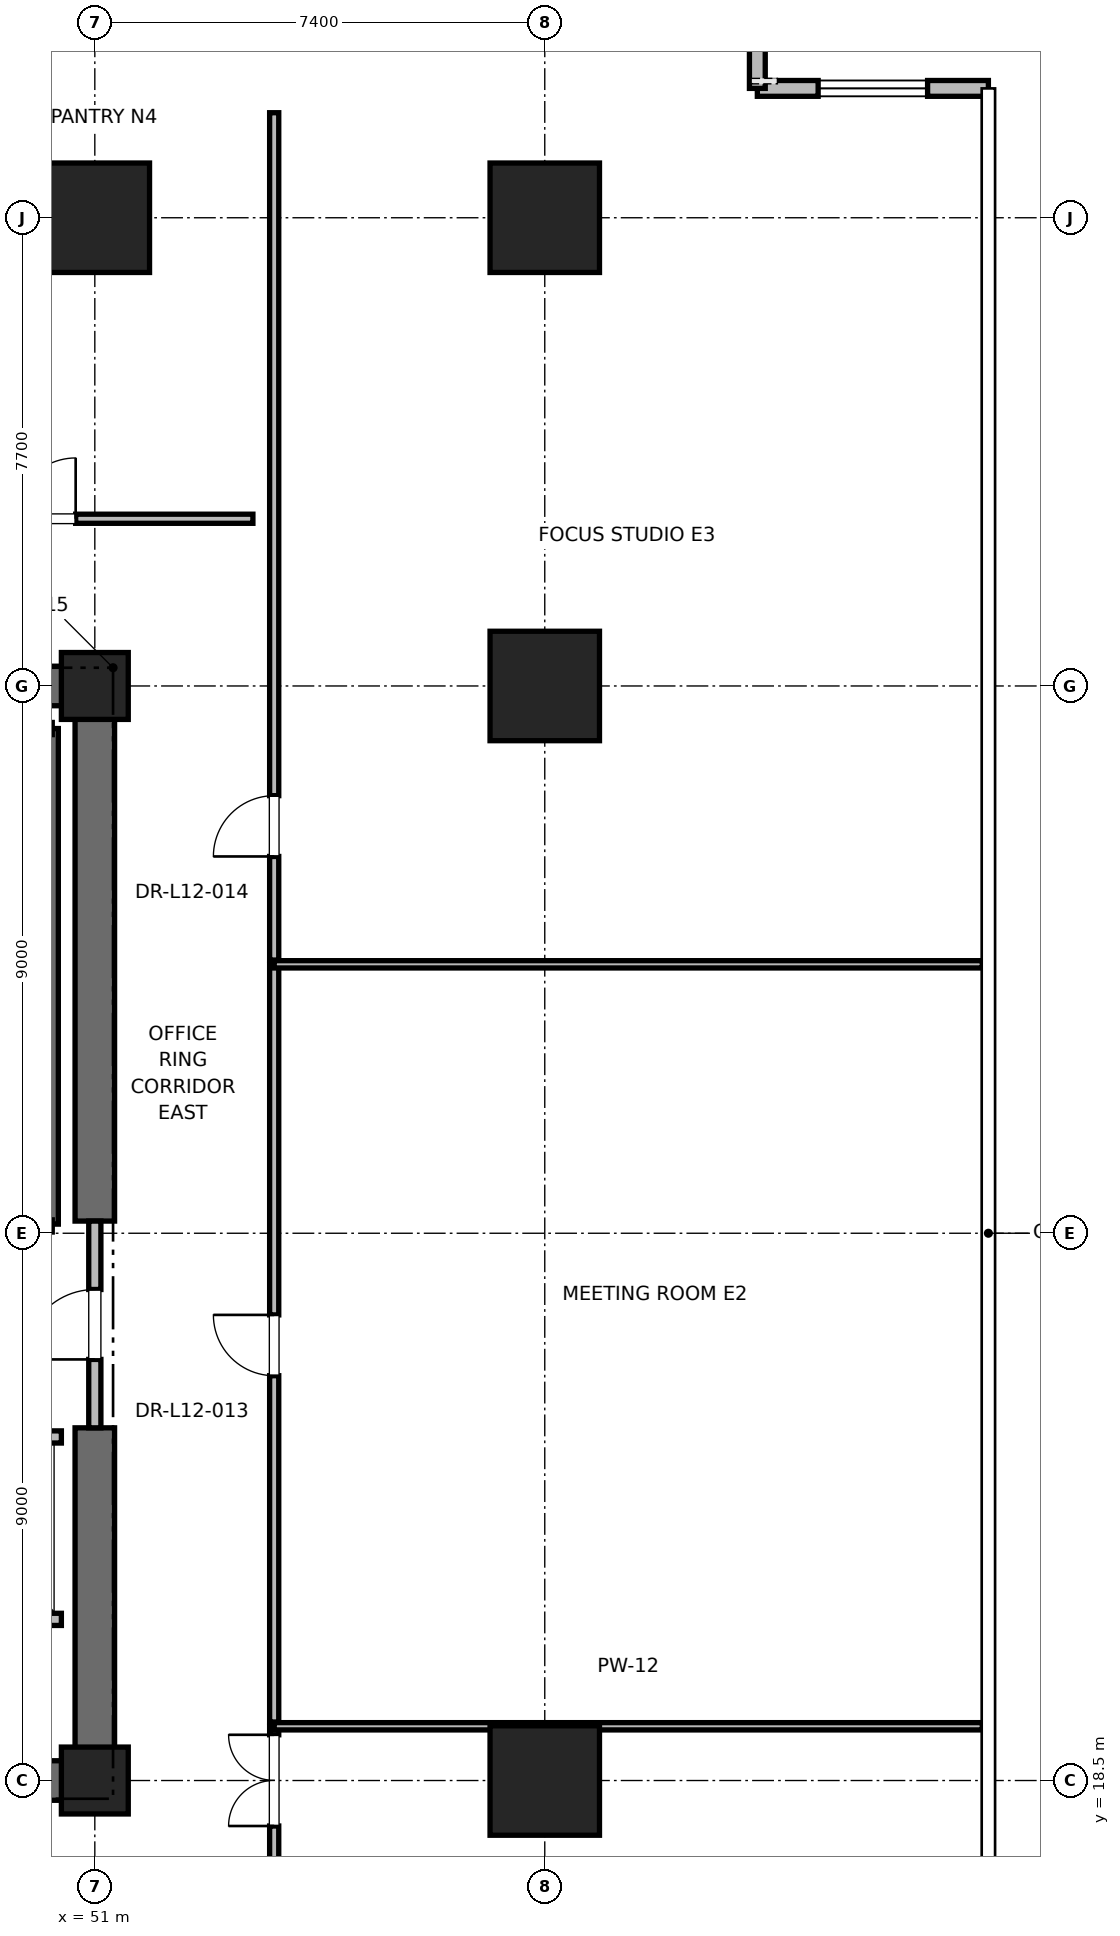
"""IFC4 building model, lengths in metres.
Left out: names, types, materials, properties, quantities, classifications, styles, units other than length and angle.
Written with IfcOpenShell. Run it as: python <this file> out.ifc"""

import sys

from ifc_helpers import new_model, si_unit, direction, frame, frame_2d, origin, origin_2d, place, context, subcontext, project, spatial, rectangle, extrude, element, fill, save


model = new_model("IFC4")
c1 = context("Model", 3, precision=1e-05, world=origin(), true_north=direction((0.0, 1.0)))
c2 = subcontext(c1, "Body", "Model", "MODEL_VIEW")
j1 = project(units=[si_unit("LENGTHUNIT", "METRE"), si_unit("PLANEANGLEUNIT", "RADIAN")], contexts=[c1])
p1 = place(None, origin())
s1 = spatial("IfcSite", under=j1, at=p1, CompositionType="ELEMENT")
p2 = place(p1, origin())
s2 = spatial("IfcBuilding", under=s1, at=p2, CompositionType="ELEMENT")
p3 = place(p2, frame((0.0, 0.0, 55.6)))
s3 = spatial("IfcBuildingStorey", under=s2, at=p3, CompositionType="ELEMENT", Elevation=55.6)
for number, where, z_axis, x_axis in (
    (1, (51.0, 44.2, 0.0), (0.0, 0.0, 1.0), (1.0, 0.0, 0.0)),
    (2, (58.4, 18.5, 0.0), (0.0, 0.0, 1.0), (1.0, 0.0, 0.0)),
    (3, (58.4, 36.5, 0.0), (0.0, 0.0, 1.0), (1.0, 0.0, 0.0)),
    (4, (58.4, 44.2, 0.0), (0.0, 0.0, 1.0), (1.0, 0.0, 0.0)),
):
    element("IfcColumn", number, at=place(p3, frame(where, z_axis=z_axis, x_axis=x_axis)), inside=s3, PredefinedType="COLUMN", context=c2, shape_type="SweptSolid", body=[
        extrude(rectangle(XDim=1.8, YDim=1.8, at=origin_2d()), origin(), (0.0, 0.0, 1.0), 4.0),
    ])
for number, where, z_axis, x_axis in (
    (5, (51.0, 18.5, 0.0), (0.0, 0.0, 1.0), (1.0, 0.0, 0.0)),
    (6, (51.0, 36.5, 0.0), (0.0, 0.0, 1.0), (1.0, 0.0, 0.0)),
):
    element("IfcColumn", number, at=place(p3, frame(where, z_axis=z_axis, x_axis=x_axis)), inside=s3, PredefinedType="PILASTER", context=c2, shape_type="SweptSolid", body=[
        extrude(rectangle(XDim=1.1, YDim=1.1, at=origin_2d()), origin(), (0.0, 0.0, 1.0), 4.0),
    ])
p4 = place(p3, frame((41.8, 18.5, 0.0), z_axis=(0.0, 0.0, 1.0), x_axis=(1.0, 0.0, 0.0)))
e7 = element("IfcWall", 7, at=p4, inside=s3, PredefinedType="SHEAR", context=c2, shape_type="SweptSolid", body=[
    extrude(rectangle(XDim=9.2, YDim=0.65, at=frame_2d((4.6, 0.0))), origin(), (0.0, 0.0, 1.0), 3.76),
])
for number, where, z_axis, x_axis in (
    (8, (45.2, 36.5, 0.0), (0.0, 0.0, 1.0), (1.0, 0.0, 0.0)),
    (9, (51.0, 18.5, 0.0), (0.0, 0.0, 1.0), (0.0, 1.0, 0.0)),
):
    element("IfcWall", number, at=place(p3, frame(where, z_axis=z_axis, x_axis=x_axis)), inside=s3, PredefinedType="SHEAR", context=c2, shape_type="SweptSolid", body=[
        extrude(rectangle(XDim=5.8, YDim=0.65, at=frame_2d((2.9, 0.0))), origin(), (0.0, 0.0, 1.0), 3.76),
    ])
p5 = place(p3, frame((51.0, 27.7, 0.0), z_axis=(0.0, 0.0, 1.0), x_axis=(0.0, 1.0, 0.0)))
e10 = element("IfcWall", 10, at=p5, inside=s3, PredefinedType="SHEAR", context=c2, shape_type="SweptSolid", body=[
    extrude(rectangle(XDim=8.8, YDim=0.65, at=frame_2d((4.4, 0.0))), origin(), (0.0, 0.0, 1.0), 3.76),
])
p6 = place(p3, frame((65.696, 46.327, 0.0), z_axis=(0.0, 0.0, 1.0), x_axis=(-1.0, 0.0, 0.0)))
e11 = element("IfcWall", 11, at=p6, inside=s3, PredefinedType="PARAPET", context=c2, shape_type="SweptSolid", body=[
    extrude(rectangle(XDim=3.8, YDim=0.26, at=frame_2d((1.9, 0.0))), origin(), (0.0, 0.0, 1.0), 3.76),
])
p7 = place(p6, frame((1.0, 0.0, 0.85)))
e12 = element("IfcOpeningElement", 12, at=p7, cuts=e11, PredefinedType="OPENING", context=c2, shape_type="SweptSolid", body=[
    extrude(rectangle(XDim=1.8, YDim=2.2, at=frame_2d((0.9, 1.1))), frame((0.0, 0.13, 0.0), z_axis=(0.0, -1.0, 0.0), x_axis=(1.0, 0.0, 0.0)), (0.0, 0.0, 1.0), 0.26),
])
p8 = place(p3, frame((61.896, 46.327, 0.0), z_axis=(0.0, 0.0, 1.0), x_axis=(0.0, 1.0, 0.0)))
e13 = element("IfcWall", 13, at=p8, inside=s3, PredefinedType="PARAPET", context=c2, shape_type="SweptSolid", body=[
    extrude(rectangle(XDim=3.4, YDim=0.26, at=frame_2d((1.7, 0.0))), origin(), (0.0, 0.0, 1.0), 3.76),
])
p9 = place(p3, frame((50.3, 27.65, 0.0), z_axis=(0.0, 0.0, 1.0), x_axis=(0.0, 1.0, 0.0)))
e14 = element("IfcWall", 14, at=p9, inside=s3, PredefinedType="SOLIDWALL", context=c2, shape_type="SweptSolid", body=[
    extrude(rectangle(XDim=8.15, YDim=0.2, at=frame_2d((4.075, 0.0))), origin(), (0.0, 0.0, 1.0), 3.76),
])
p10 = place(p3, frame((51.0, 24.3, 0.0), z_axis=(0.0, 0.0, 1.0), x_axis=(0.0, 1.0, 0.0)))
e15 = element("IfcWall", 15, at=p10, inside=s3, PredefinedType="PARTITIONING", context=c2, shape_type="SweptSolid", body=[
    extrude(rectangle(XDim=3.4, YDim=0.2, at=frame_2d((1.7, 0.0))), origin(), (0.0, 0.0, 1.0), 2.54),
])
p11 = place(p10, frame((1.125, 0.0, 0.0)))
e16 = element("IfcOpeningElement", 16, at=p11, cuts=e15, PredefinedType="OPENING", context=c2, shape_type="SweptSolid", body=[
    extrude(rectangle(XDim=1.15, YDim=2.2, at=frame_2d((0.575, 1.1))), frame((0.0, 0.1, 0.0), z_axis=(0.0, -1.0, 0.0), x_axis=(1.0, 0.0, 0.0)), (0.0, 0.0, 1.0), 0.2),
])
p12 = place(p3, frame((47.85, 21.15, 0.0), z_axis=(0.0, 0.0, 1.0), x_axis=(1.0, 0.0, 0.0)))
e17 = element("IfcWall", 17, at=p12, inside=s3, PredefinedType="SOLIDWALL", context=c2, shape_type="SweptSolid", body=[
    extrude(rectangle(XDim=2.6, YDim=0.2, at=frame_2d((1.3, 0.0))), origin(), (0.0, 0.0, 1.0), 3.76),
])
p13 = place(p3, frame((50.45, 24.15, 0.0), z_axis=(0.0, 0.0, 1.0), x_axis=(-1.0, 0.0, 0.0)))
e18 = element("IfcWall", 18, at=p13, inside=s3, PredefinedType="SOLIDWALL", context=c2, shape_type="SweptSolid", body=[
    extrude(rectangle(XDim=2.6, YDim=0.2, at=frame_2d((1.3, 0.0))), origin(), (0.0, 0.0, 1.0), 2.54),
])
p14 = place(p13, frame((0.75, 0.0, 0.0)))
e19 = element("IfcOpeningElement", 19, at=p14, cuts=e18, PredefinedType="OPENING", context=c2, shape_type="SweptSolid", body=[
    extrude(rectangle(XDim=1.1, YDim=2.2, at=frame_2d((0.55, 1.1))), frame((0.0, 0.1, 0.0), z_axis=(0.0, -1.0, 0.0), x_axis=(1.0, 0.0, 0.0)), (0.0, 0.0, 1.0), 0.2),
])
p15 = place(p3, frame((46.87, 39.25, 0.0), z_axis=(0.0, 0.0, 1.0), x_axis=(1.0, 0.0, 0.0)))
e20 = element("IfcWall", 20, at=p15, inside=s3, PredefinedType="PARTITIONING", context=c2, shape_type="SweptSolid", body=[
    extrude(rectangle(XDim=6.73, YDim=0.15, at=frame_2d((3.365, 0.0))), origin(), (0.0, 0.0, 1.0), 2.85),
])
p16 = place(p15, frame((2.815, 0.0, 0.0)))
e21 = element("IfcOpeningElement", 21, at=p16, cuts=e20, PredefinedType="OPENING", context=c2, shape_type="SweptSolid", body=[
    extrude(rectangle(XDim=1.0, YDim=2.15, at=frame_2d((0.5, 1.075))), frame((0.0, 0.075, 0.0), z_axis=(0.0, -1.0, 0.0), x_axis=(1.0, 0.0, 0.0)), (0.0, 0.0, 1.0), 0.15),
])
p17 = place(p3, frame((53.95, 9.073, 0.0), z_axis=(0.0, 0.0, 1.0), x_axis=(0.0, 1.0, 0.0)))
e22 = element("IfcWall", 22, at=p17, inside=s3, PredefinedType="PARTITIONING", context=c2, shape_type="SweptSolid", body=[
    extrude(rectangle(XDim=10.319, YDim=0.15, at=frame_2d((5.16, 0.0))), origin(), (0.0, 0.0, 1.0), 2.85),
])
p18 = place(p17, frame((8.679, 0.0, 0.0)))
e23 = element("IfcOpeningElement", 23, at=p18, cuts=e22, PredefinedType="OPENING", context=c2, shape_type="SweptSolid", body=[
    extrude(rectangle(XDim=1.5, YDim=2.25, at=frame_2d((0.75, 1.125))), frame((0.0, 0.075, 0.0), z_axis=(0.0, -1.0, 0.0), x_axis=(1.0, 0.0, 0.0)), (0.0, 0.0, 1.0), 0.15),
])
p19 = place(p3, frame((53.95, 19.392, 0.0), z_axis=(0.0, 0.0, 1.0), x_axis=(1.0, 0.0, 0.0)))
e24 = element("IfcWall", 24, at=p19, inside=s3, PredefinedType="PARTITIONING", context=c2, shape_type="SweptSolid", body=[
    extrude(rectangle(XDim=11.646, YDim=0.12, at=frame_2d((5.823, 0.0))), origin(), (0.0, 0.0, 1.0), 2.85),
])
p20 = place(p3, frame((53.95, 19.462, 0.0), z_axis=(0.0, 0.0, 1.0), x_axis=(0.0, 1.0, 0.0)))
e25 = element("IfcWall", 25, at=p20, inside=s3, PredefinedType="PARTITIONING", context=c2, shape_type="SweptSolid", body=[
    extrude(rectangle(XDim=12.461, YDim=0.15, at=frame_2d((6.23, 0.0))), origin(), (0.0, 0.0, 1.0), 2.85),
])
p21 = place(p20, frame((5.695, 0.0, 0.0)))
e26 = element("IfcOpeningElement", 26, at=p21, cuts=e25, PredefinedType="OPENING", context=c2, shape_type="SweptSolid", body=[
    extrude(rectangle(XDim=1.0, YDim=2.15, at=frame_2d((0.5, 1.075))), frame((0.0, 0.075, 0.0), z_axis=(0.0, -1.0, 0.0), x_axis=(1.0, 0.0, 0.0)), (0.0, 0.0, 1.0), 0.15),
])
p22 = place(p3, frame((53.95, 31.923, 0.0), z_axis=(0.0, 0.0, 1.0), x_axis=(1.0, 0.0, 0.0)))
e27 = element("IfcWall", 27, at=p22, inside=s3, PredefinedType="PARTITIONING", context=c2, shape_type="SweptSolid", body=[
    extrude(rectangle(XDim=11.646, YDim=0.12, at=frame_2d((5.823, 0.0))), origin(), (0.0, 0.0, 1.0), 2.85),
])
p23 = place(p3, frame((53.95, 31.992, 0.0), z_axis=(0.0, 0.0, 1.0), x_axis=(0.0, 1.0, 0.0)))
e28 = element("IfcWall", 28, at=p23, inside=s3, PredefinedType="PARTITIONING", context=c2, shape_type="SweptSolid", body=[
    extrude(rectangle(XDim=13.935, YDim=0.15, at=frame_2d((6.967, 0.0))), origin(), (0.0, 0.0, 1.0), 2.85),
])
p24 = place(p23, frame((1.704, 0.0, 0.0)))
e29 = element("IfcOpeningElement", 29, at=p24, cuts=e28, PredefinedType="OPENING", context=c2, shape_type="SweptSolid", body=[
    extrude(rectangle(XDim=1.0, YDim=2.15, at=frame_2d((0.5, 1.075))), frame((0.0, 0.075, 0.0), z_axis=(0.0, -1.0, 0.0), x_axis=(1.0, 0.0, 0.0)), (0.0, 0.0, 1.0), 0.15),
])
p25 = place(p7, origin())
e30 = element("IfcWindow", 30, at=p25, inside=s3, PartitioningType="SINGLE_PANEL", PredefinedType="WINDOW", context=c2, shape_type="SweptSolid", body=[
    extrude(rectangle(XDim=1.8, YDim=2.2, at=frame_2d((0.9, 1.1))), frame((0.0, 0.03, 0.0), z_axis=(0.0, -1.0, 0.0), x_axis=(1.0, 0.0, 0.0)), (0.0, 0.0, 1.0), 0.06),
])
fill(e12, e30)
p26 = place(p11, origin())
e31 = element("IfcDoor", 31, at=p26, inside=s3, OperationType="SINGLE_SWING_LEFT", PredefinedType="DOOR", context=c2, shape_type="SweptSolid", body=[
    extrude(rectangle(XDim=1.15, YDim=2.2, at=frame_2d((0.575, 1.1))), frame((0.0, 0.025, 0.0), z_axis=(0.0, -1.0, 0.0), x_axis=(1.0, 0.0, 0.0)), (0.0, 0.0, 1.0), 0.05),
])
fill(e16, e31)
p27 = place(p16, origin())
e32 = element("IfcDoor", 32, at=p27, inside=s3, OperationType="SINGLE_SWING_RIGHT", PredefinedType="DOOR", context=c2, shape_type="SweptSolid", body=[
    extrude(rectangle(XDim=1.0, YDim=2.15, at=frame_2d((0.5, 1.075))), frame((0.0, 0.025, 0.0), z_axis=(0.0, -1.0, 0.0), x_axis=(1.0, 0.0, 0.0)), (0.0, 0.0, 1.0), 0.05),
])
fill(e21, e32)
p28 = place(p18, origin())
e33 = element("IfcDoor", 33, at=p28, inside=s3, OperationType="DOUBLE_DOOR_SINGLE_SWING", PredefinedType="DOOR", context=c2, shape_type="SweptSolid", body=[
    extrude(rectangle(XDim=1.5, YDim=2.25, at=frame_2d((0.75, 1.125))), frame((0.0, 0.025, 0.0), z_axis=(0.0, -1.0, 0.0), x_axis=(1.0, 0.0, 0.0)), (0.0, 0.0, 1.0), 0.05),
])
fill(e23, e33)
p29 = place(p21, origin())
e34 = element("IfcDoor", 34, at=p29, inside=s3, OperationType="SINGLE_SWING_RIGHT", PredefinedType="DOOR", context=c2, shape_type="SweptSolid", body=[
    extrude(rectangle(XDim=1.0, YDim=2.15, at=frame_2d((0.5, 1.075))), frame((0.0, 0.025, 0.0), z_axis=(0.0, -1.0, 0.0), x_axis=(1.0, 0.0, 0.0)), (0.0, 0.0, 1.0), 0.05),
])
fill(e26, e34)
p30 = place(p24, origin())
e35 = element("IfcDoor", 35, at=p30, inside=s3, OperationType="SINGLE_SWING_LEFT", PredefinedType="DOOR", context=c2, shape_type="SweptSolid", body=[
    extrude(rectangle(XDim=1.0, YDim=2.15, at=frame_2d((0.5, 1.075))), frame((0.0, 0.025, 0.0), z_axis=(0.0, -1.0, 0.0), x_axis=(1.0, 0.0, 0.0)), (0.0, 0.0, 1.0), 0.05),
])
fill(e29, e35)
save(model, sys.argv[1])
